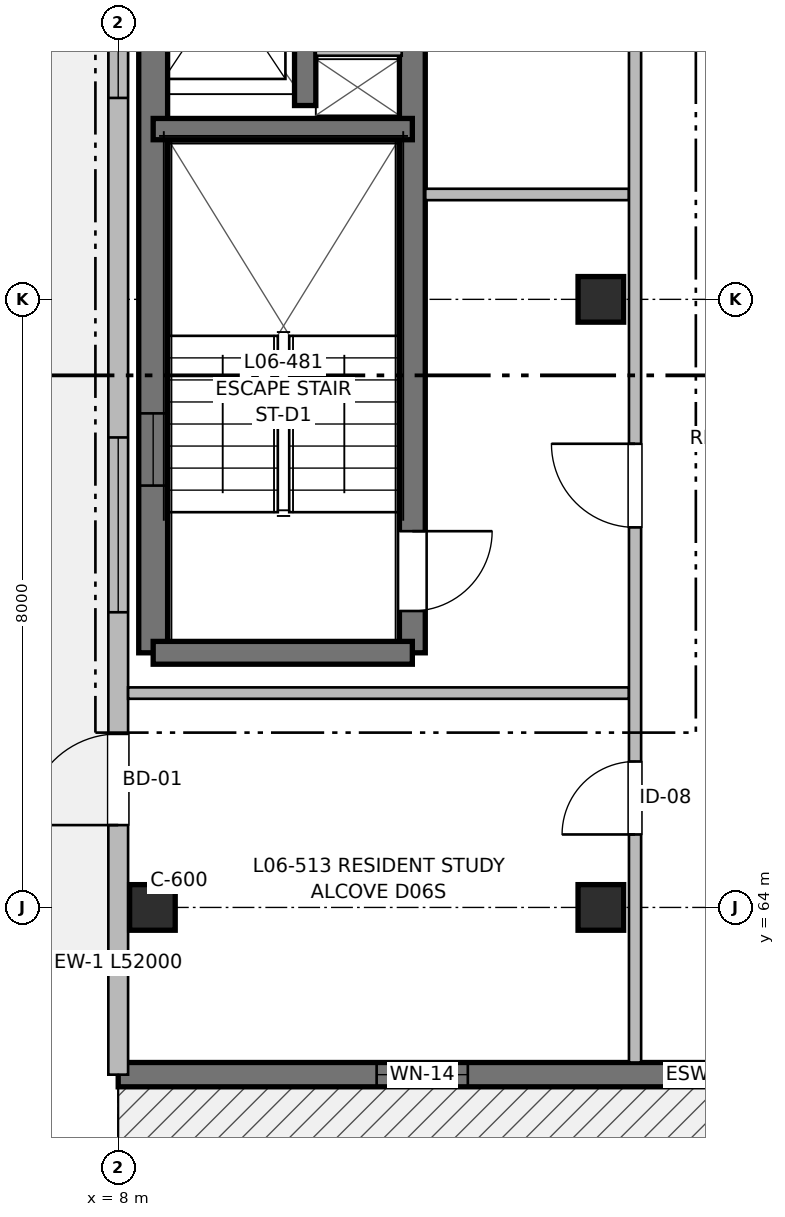
"""IFC4 building model, lengths in metres.
Left out: names, types, materials, properties, quantities, classifications, styles, units other than length and angle.
Written with IfcOpenShell. Run it as: python <this file> out.ifc"""

import sys

from ifc_helpers import new_model, si_unit, direction, frame, frame_2d, origin, origin_2d, place, context, subcontext, project, spatial, rectangle, extrude, element, fill, save


model = new_model("IFC4")
c1 = context("Model", 3, precision=1e-05, world=origin(), true_north=direction((0.0, 1.0)))
c2 = subcontext(c1, "Body", "Model", "MODEL_VIEW")
j1 = project(units=[si_unit("LENGTHUNIT", "METRE"), si_unit("PLANEANGLEUNIT", "RADIAN")], contexts=[c1])
p1 = place(None, origin())
s1 = spatial("IfcSite", under=j1, at=p1, CompositionType="ELEMENT")
p2 = place(p1, origin())
s2 = spatial("IfcBuilding", under=s1, at=p2, CompositionType="ELEMENT")
p3 = place(p2, frame((0.0, 0.0, 20.16)))
s3 = spatial("IfcBuildingStorey", under=s2, at=p3, CompositionType="ELEMENT", Elevation=20.16)
for number, where, z_axis, x_axis in (
    (1, (8.45, 64.0, 0.0), (0.0, 0.0, 1.0), (1.0, 0.0, 0.0)),
    (2, (14.35, 64.0, 0.0), (0.0, 0.0, 1.0), (1.0, 0.0, 0.0)),
    (3, (14.35, 72.0, 0.0), (0.0, 0.0, 1.0), (1.0, 0.0, 0.0)),
):
    element("IfcColumn", number, at=place(p3, frame(where, z_axis=z_axis, x_axis=x_axis)), inside=s3, PredefinedType="COLUMN", context=c2, shape_type="SweptSolid", body=[
        extrude(rectangle(XDim=0.6, YDim=0.6, at=origin_2d()), origin(), (0.0, 0.0, 1.0), 3.2),
    ])
p4 = place(p3, frame((8.46, 67.35, 0.0), z_axis=(0.0, 0.0, 1.0), x_axis=(0.0, 1.0, 0.0)))
e4 = element("IfcWall", 4, at=p4, inside=s3, PredefinedType="SHEAR", context=c2, shape_type="SweptSolid", body=[
    extrude(rectangle(XDim=12.45, YDim=0.38, at=frame_2d((6.225, 0.0))), origin(), (0.0, 0.0, 1.0), 3.2),
])
p5 = place(p4, frame((2.2, 0.0, 0.97)))
e5 = element("IfcOpeningElement", 5, at=p5, cuts=e4, PredefinedType="OPENING", context=c2, shape_type="SweptSolid", body=[
    extrude(rectangle(XDim=0.95, YDim=1.25, at=frame_2d((0.475, 0.625))), frame((0.0, 0.2, 0.0), z_axis=(0.0, -1.0, 0.0), x_axis=(1.0, 0.0, 0.0)), (0.0, 0.0, 1.0), 0.4),
])
p6 = place(p3, frame((11.87, 79.8, 0.0), z_axis=(0.0, 0.0, 1.0), x_axis=(0.0, -1.0, 0.0)))
e6 = element("IfcWall", 6, at=p6, inside=s3, PredefinedType="SHEAR", context=c2, shape_type="SweptSolid", body=[
    extrude(rectangle(XDim=12.45, YDim=0.34, at=frame_2d((6.225, 0.0))), origin(), (0.0, 0.0, 1.0), 3.2),
])
p7 = place(p6, frame((10.85, 0.0, 0.0)))
e7 = element("IfcOpeningElement", 7, at=p7, cuts=e6, PredefinedType="OPENING", context=c2, shape_type="SweptSolid", body=[
    extrude(rectangle(XDim=1.05, YDim=2.15, at=frame_2d((0.525, 1.075))), frame((0.0, 0.18, 0.0), z_axis=(0.0, -1.0, 0.0), x_axis=(1.0, 0.0, 0.0)), (0.0, 0.0, 1.0), 0.36),
])
p8 = place(p3, frame((11.87, 67.35, 0.0), z_axis=(0.0, 0.0, 1.0), x_axis=(-1.0, 0.0, 0.0)))
e8 = element("IfcWall", 8, at=p8, inside=s3, PredefinedType="SHEAR", context=c2, shape_type="SweptSolid", body=[
    extrude(rectangle(XDim=3.41, YDim=0.3, at=frame_2d((1.705, 0.0))), origin(), (0.0, 0.0, 1.0), 3.2),
])
p9 = place(p3, frame((8.46, 74.24, 0.0), z_axis=(0.0, 0.0, 1.0), x_axis=(1.0, 0.0, 0.0)))
e9 = element("IfcWall", 9, at=p9, inside=s3, PredefinedType="SHEAR", context=c2, shape_type="SweptSolid", body=[
    extrude(rectangle(XDim=3.41, YDim=0.28, at=frame_2d((1.705, 0.0))), origin(), (0.0, 0.0, 1.0), 3.2),
])
p10 = place(p3, frame((10.46, 74.55, 0.0), z_axis=(0.0, 0.0, 1.0), x_axis=(0.0, 1.0, 0.0)))
e10 = element("IfcWall", 10, at=p10, inside=s3, PredefinedType="SHEAR", context=c2, shape_type="SweptSolid", body=[
    extrude(rectangle(XDim=5.25, YDim=0.28, at=frame_2d((2.625, 0.0))), origin(), (0.0, 0.0, 1.0), 3.2),
])
p11 = place(p10, frame((1.15, 0.0, 0.0)))
e11 = element("IfcOpeningElement", 11, at=p11, cuts=e10, PredefinedType="OPENING", context=c2, shape_type="SweptSolid", body=[
    extrude(rectangle(XDim=1.0, YDim=2.15, at=frame_2d((0.5, 1.075))), frame((0.0, 0.15, 0.0), z_axis=(0.0, -1.0, 0.0), x_axis=(1.0, 0.0, 0.0)), (0.0, 0.0, 1.0), 0.3),
])
p12 = place(p10, frame((3.85, 0.0, 0.0)))
e12 = element("IfcOpeningElement", 12, at=p12, cuts=e10, PredefinedType="OPENING", context=c2, shape_type="SweptSolid", body=[
    extrude(rectangle(XDim=0.9, YDim=2.15, at=frame_2d((0.45, 1.075))), frame((0.0, 0.15, 0.0), z_axis=(0.0, -1.0, 0.0), x_axis=(1.0, 0.0, 0.0)), (0.0, 0.0, 1.0), 0.3),
])
p13 = place(p3, frame((10.6, 75.28, 0.0), z_axis=(0.0, 0.0, 1.0), x_axis=(1.0, 0.0, 0.0)))
e13 = element("IfcWall", 13, at=p13, inside=s3, PredefinedType="PARTITIONING", context=c2, shape_type="SweptSolid", body=[
    extrude(rectangle(XDim=1.13, YDim=0.15, at=frame_2d((0.565, 0.0))), origin(), (0.0, 0.0, 1.0), 2.95),
])
p14 = place(p3, frame((24.0, 61.8, 0.0), z_axis=(0.0, 0.0, 1.0), x_axis=(-1.0, 0.0, 0.0)))
e14 = element("IfcWall", 14, at=p14, inside=s3, PredefinedType="SHEAR", context=c2, shape_type="SweptSolid", body=[
    extrude(rectangle(XDim=16.0, YDim=0.32, at=frame_2d((8.0, 0.0))), origin(), (0.0, 0.0, 1.0), 2.98),
])
p15 = place(p14, frame((3.0, 0.0, 0.0)))
e15 = element("IfcOpeningElement", 15, at=p15, cuts=e14, PredefinedType="OPENING", context=c2, shape_type="SweptSolid", body=[
    extrude(rectangle(XDim=1.35, YDim=2.2, at=frame_2d((0.675, 1.1))), frame((0.0, 0.17, 0.0), z_axis=(0.0, -1.0, 0.0), x_axis=(1.0, 0.0, 0.0)), (0.0, 0.0, 1.0), 0.34),
])
p16 = place(p14, frame((11.4, 0.0, 0.9)))
e16 = element("IfcOpeningElement", 16, at=p16, cuts=e14, PredefinedType="OPENING", context=c2, shape_type="SweptSolid", body=[
    extrude(rectangle(XDim=1.2, YDim=1.05, at=frame_2d((0.6, 0.525))), frame((0.0, 0.17, 0.0), z_axis=(0.0, -1.0, 0.0), x_axis=(1.0, 0.0, 0.0)), (0.0, 0.0, 1.0), 0.34),
])
p17 = place(p3, frame((8.0, 61.8, 0.0), z_axis=(0.0, 0.0, 1.0), x_axis=(0.0, 1.0, 0.0)))
e17 = element("IfcWall", 17, at=p17, inside=s3, PredefinedType="SOLIDWALL", context=c2, shape_type="SweptSolid", body=[
    extrude(rectangle(XDim=52.0, YDim=0.26, at=frame_2d((26.0, 0.0))), origin(), (0.0, 0.0, 1.0), 2.98),
])
p18 = place(p17, frame((3.283, 0.0, 0.0)))
e18 = element("IfcOpeningElement", 18, at=p18, cuts=e17, PredefinedType="OPENING", context=c2, shape_type="SweptSolid", body=[
    extrude(rectangle(XDim=1.2, YDim=2.2, at=frame_2d((0.6, 1.1))), frame((0.0, 0.14, 0.0), z_axis=(0.0, -1.0, 0.0), x_axis=(1.0, 0.0, 0.0)), (0.0, 0.0, 1.0), 0.28),
])
p19 = place(p17, frame((6.083, 0.0, 0.57)))
e19 = element("IfcOpeningElement", 19, at=p19, cuts=e17, PredefinedType="OPENING", context=c2, shape_type="SweptSolid", body=[
    extrude(rectangle(XDim=2.3, YDim=1.65, at=frame_2d((1.15, 0.825))), frame((0.0, 0.14, 0.0), z_axis=(0.0, -1.0, 0.0), x_axis=(1.0, 0.0, 0.0)), (0.0, 0.0, 1.0), 0.28),
])
p20 = place(p17, frame((12.85, 0.0, 0.9)))
e20 = element("IfcOpeningElement", 20, at=p20, cuts=e17, PredefinedType="OPENING", context=c2, shape_type="SweptSolid", body=[
    extrude(rectangle(XDim=1.2, YDim=1.05, at=frame_2d((0.6, 0.525))), frame((0.0, 0.14, 0.0), z_axis=(0.0, -1.0, 0.0), x_axis=(1.0, 0.0, 0.0)), (0.0, 0.0, 1.0), 0.28),
])
p21 = place(p17, frame((21.342, 0.0, 0.9)))
e21 = element("IfcOpeningElement", 21, at=p21, cuts=e17, PredefinedType="OPENING", context=c2, shape_type="SweptSolid", body=[
    extrude(rectangle(XDim=0.65, YDim=0.95, at=frame_2d((0.325, 0.475))), frame((0.0, 0.14, 0.0), z_axis=(0.0, -1.0, 0.0), x_axis=(1.0, 0.0, 0.0)), (0.0, 0.0, 1.0), 0.28),
])
p22 = place(p17, frame((29.333, 0.0, 0.62)))
e22 = element("IfcOpeningElement", 22, at=p22, cuts=e17, PredefinedType="OPENING", context=c2, shape_type="SweptSolid", body=[
    extrude(rectangle(XDim=1.1, YDim=1.6, at=frame_2d((0.55, 0.8))), frame((0.0, 0.14, 0.0), z_axis=(0.0, -1.0, 0.0), x_axis=(1.0, 0.0, 0.0)), (0.0, 0.0, 1.0), 0.28),
])
p23 = place(p17, frame((35.3, 0.0, 0.47)))
e23 = element("IfcOpeningElement", 23, at=p23, cuts=e17, PredefinedType="OPENING", context=c2, shape_type="SweptSolid", body=[
    extrude(rectangle(XDim=2.7, YDim=1.75, at=frame_2d((1.35, 0.875))), frame((0.0, 0.14, 0.0), z_axis=(0.0, -1.0, 0.0), x_axis=(1.0, 0.0, 0.0)), (0.0, 0.0, 1.0), 0.28),
])
p24 = place(p17, frame((45.517, 0.0, 0.72)))
e24 = element("IfcOpeningElement", 24, at=p24, cuts=e17, PredefinedType="OPENING", context=c2, shape_type="SweptSolid", body=[
    extrude(rectangle(XDim=1.7, YDim=1.5, at=frame_2d((0.85, 0.75))), frame((0.0, 0.14, 0.0), z_axis=(0.0, -1.0, 0.0), x_axis=(1.0, 0.0, 0.0)), (0.0, 0.0, 1.0), 0.28),
])
p25 = place(p3, frame((8.13, 66.82, 0.0), z_axis=(0.0, 0.0, 1.0), x_axis=(1.0, 0.0, 0.0)))
e25 = element("IfcWall", 25, at=p25, inside=s3, PredefinedType="PARTITIONING", context=c2, shape_type="SweptSolid", body=[
    extrude(rectangle(XDim=6.59, YDim=0.15, at=frame_2d((3.295, 0.0))), origin(), (0.0, 0.0, 1.0), 2.935),
])
p26 = place(p3, frame((12.04, 73.38, 0.0), z_axis=(0.0, 0.0, 1.0), x_axis=(1.0, 0.0, 0.0)))
e26 = element("IfcWall", 26, at=p26, inside=s3, PredefinedType="PARTITIONING", context=c2, shape_type="SweptSolid", body=[
    extrude(rectangle(XDim=2.68, YDim=0.15, at=frame_2d((1.34, 0.0))), origin(), (0.0, 0.0, 1.0), 2.935),
])
p27 = place(p3, frame((14.8, 61.96, 0.0), z_axis=(0.0, 0.0, 1.0), x_axis=(0.0, 1.0, 0.0)))
e27 = element("IfcWall", 27, at=p27, inside=s3, PredefinedType="PARTITIONING", context=c2, shape_type="SweptSolid", body=[
    extrude(rectangle(XDim=44.84, YDim=0.16, at=frame_2d((22.42, 0.0))), origin(), (0.0, 0.0, 1.0), 2.935),
])
p28 = place(p27, frame((7.04, 0.0, 0.0)))
e28 = element("IfcOpeningElement", 28, at=p28, cuts=e27, PredefinedType="OPENING", context=c2, shape_type="SweptSolid", body=[
    extrude(rectangle(XDim=1.1, YDim=2.15, at=frame_2d((0.55, 1.075))), frame((0.0, 0.09, 0.0), z_axis=(0.0, -1.0, 0.0), x_axis=(1.0, 0.0, 0.0)), (0.0, 0.0, 1.0), 0.18),
])
p29 = place(p27, frame((13.44, 0.0, 0.0)))
e29 = element("IfcOpeningElement", 29, at=p29, cuts=e27, PredefinedType="OPENING", context=c2, shape_type="SweptSolid", body=[
    extrude(rectangle(XDim=1.6, YDim=2.15, at=frame_2d((0.8, 1.075))), frame((0.0, 0.09, 0.0), z_axis=(0.0, -1.0, 0.0), x_axis=(1.0, 0.0, 0.0)), (0.0, 0.0, 1.0), 0.18),
])
p30 = place(p27, frame((3.0, 0.0, 0.0)))
e30 = element("IfcOpeningElement", 30, at=p30, cuts=e27, PredefinedType="OPENING", context=c2, shape_type="SweptSolid", body=[
    extrude(rectangle(XDim=0.96, YDim=2.15, at=frame_2d((0.48, 1.075))), frame((0.0, 0.09, 0.0), z_axis=(0.0, -1.0, 0.0), x_axis=(1.0, 0.0, 0.0)), (0.0, 0.0, 1.0), 0.18),
])
p31 = place(p27, frame((27.045, 0.0, 0.0)))
e31 = element("IfcOpeningElement", 31, at=p31, cuts=e27, PredefinedType="OPENING", context=c2, shape_type="SweptSolid", body=[
    extrude(rectangle(XDim=0.98, YDim=2.15, at=frame_2d((0.49, 1.075))), frame((0.0, 0.09, 0.0), z_axis=(0.0, -1.0, 0.0), x_axis=(1.0, 0.0, 0.0)), (0.0, 0.0, 1.0), 0.18),
])
p32 = place(p27, frame((34.855, 0.0, 0.0)))
e32 = element("IfcOpeningElement", 32, at=p32, cuts=e27, PredefinedType="OPENING", context=c2, shape_type="SweptSolid", body=[
    extrude(rectangle(XDim=0.98, YDim=2.15, at=frame_2d((0.49, 1.075))), frame((0.0, 0.09, 0.0), z_axis=(0.0, -1.0, 0.0), x_axis=(1.0, 0.0, 0.0)), (0.0, 0.0, 1.0), 0.18),
])
p33 = place(p7, origin())
e33 = element("IfcDoor", 33, at=p33, inside=s3, OperationType="SINGLE_SWING_LEFT", PredefinedType="DOOR", context=c2, shape_type="SweptSolid", body=[
    extrude(rectangle(XDim=1.05, YDim=2.15, at=frame_2d((0.525, 1.075))), frame((0.0, 0.025, 0.0), z_axis=(0.0, -1.0, 0.0), x_axis=(1.0, 0.0, 0.0)), (0.0, 0.0, 1.0), 0.05),
])
fill(e7, e33)
p34 = place(p5, origin())
e34 = element("IfcWindow", 34, at=p34, inside=s3, PartitioningType="SINGLE_PANEL", PredefinedType="WINDOW", context=c2, shape_type="SweptSolid", body=[
    extrude(rectangle(XDim=0.95, YDim=1.25, at=frame_2d((0.475, 0.625))), frame((0.0, 0.03, 0.0), z_axis=(0.0, -1.0, 0.0), x_axis=(1.0, 0.0, 0.0)), (0.0, 0.0, 1.0), 0.06),
])
fill(e5, e34)
p35 = place(p16, origin())
e35 = element("IfcWindow", 35, at=p35, inside=s3, PartitioningType="SINGLE_PANEL", PredefinedType="WINDOW", context=c2, shape_type="SweptSolid", body=[
    extrude(rectangle(XDim=1.2, YDim=1.05, at=frame_2d((0.6, 0.525))), frame((0.0, 0.03, 0.0), z_axis=(0.0, -1.0, 0.0), x_axis=(1.0, 0.0, 0.0)), (0.0, 0.0, 1.0), 0.06),
])
fill(e16, e35)
p36 = place(p18, origin())
e36 = element("IfcDoor", 36, at=p36, inside=s3, OperationType="SINGLE_SWING_LEFT", PredefinedType="DOOR", context=c2, shape_type="SweptSolid", body=[
    extrude(rectangle(XDim=1.2, YDim=2.2, at=frame_2d((0.6, 1.1))), frame((0.0, 0.025, 0.0), z_axis=(0.0, -1.0, 0.0), x_axis=(1.0, 0.0, 0.0)), (0.0, 0.0, 1.0), 0.05),
])
fill(e18, e36)
p37 = place(p19, origin())
e37 = element("IfcWindow", 37, at=p37, inside=s3, PartitioningType="SINGLE_PANEL", PredefinedType="WINDOW", context=c2, shape_type="SweptSolid", body=[
    extrude(rectangle(XDim=2.3, YDim=1.65, at=frame_2d((1.15, 0.825))), frame((0.0, 0.03, 0.0), z_axis=(0.0, -1.0, 0.0), x_axis=(1.0, 0.0, 0.0)), (0.0, 0.0, 1.0), 0.06),
])
fill(e19, e37)
p38 = place(p20, origin())
e38 = element("IfcWindow", 38, at=p38, inside=s3, PartitioningType="SINGLE_PANEL", PredefinedType="WINDOW", context=c2, shape_type="SweptSolid", body=[
    extrude(rectangle(XDim=1.2, YDim=1.05, at=frame_2d((0.6, 0.525))), frame((0.0, 0.03, 0.0), z_axis=(0.0, -1.0, 0.0), x_axis=(1.0, 0.0, 0.0)), (0.0, 0.0, 1.0), 0.06),
])
fill(e20, e38)
p39 = place(p28, origin())
e39 = element("IfcDoor", 39, at=p39, inside=s3, OperationType="SINGLE_SWING_RIGHT", PredefinedType="DOOR", context=c2, shape_type="SweptSolid", body=[
    extrude(rectangle(XDim=1.1, YDim=2.15, at=frame_2d((0.55, 1.075))), frame((0.0, 0.025, 0.0), z_axis=(0.0, -1.0, 0.0), x_axis=(1.0, 0.0, 0.0)), (0.0, 0.0, 1.0), 0.05),
])
fill(e28, e39)
p40 = place(p30, origin())
e40 = element("IfcDoor", 40, at=p40, inside=s3, OperationType="SINGLE_SWING_LEFT", PredefinedType="DOOR", context=c2, shape_type="SweptSolid", body=[
    extrude(rectangle(XDim=0.96, YDim=2.15, at=frame_2d((0.48, 1.075))), frame((0.0, 0.025, 0.0), z_axis=(0.0, -1.0, 0.0), x_axis=(1.0, 0.0, 0.0)), (0.0, 0.0, 1.0), 0.05),
])
fill(e30, e40)
save(model, sys.argv[1])
